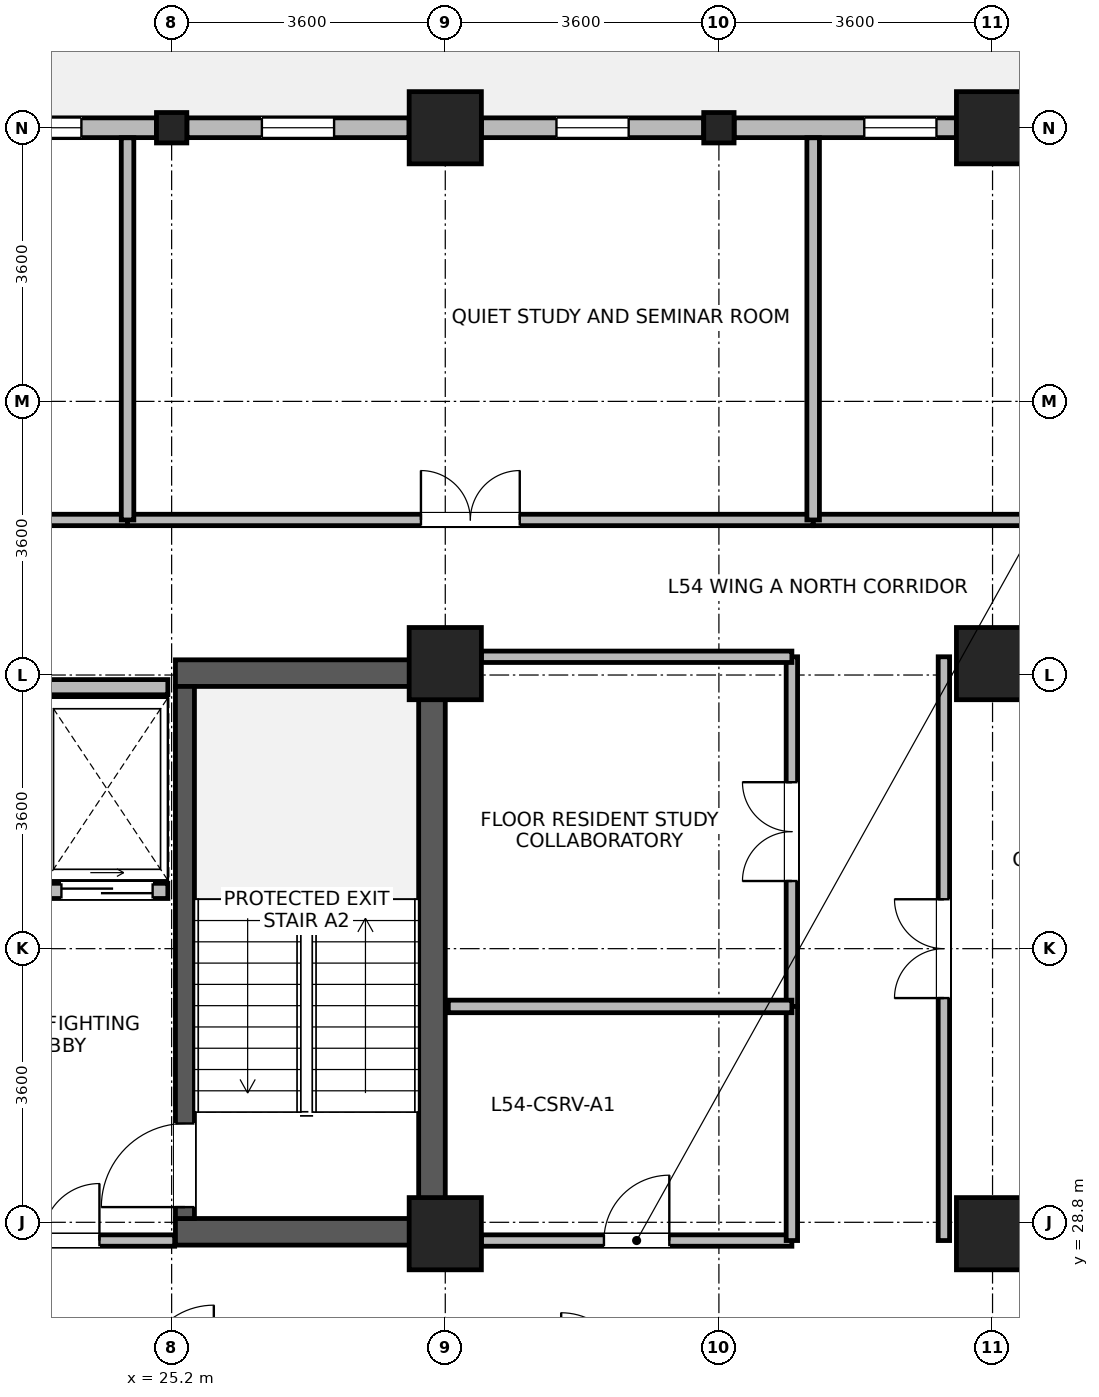
"""IFC4 building model, lengths in metres.
Left out: names, types, materials, properties, quantities, classifications, styles, units other than length and angle.
Written with IfcOpenShell. Run it as: python <this file> out.ifc"""

import sys

from ifc_helpers import new_model, si_unit, direction, frame, frame_2d, origin, origin_2d, place, context, subcontext, project, spatial, rectangle, i_section, extrude, source, transform, mapped, element, fill, save


model = new_model("IFC4")
c1 = context("Model", 3, precision=1e-05, world=origin(), true_north=direction((0.0, 1.0)))
c2 = subcontext(c1, "Body", "Model", "MODEL_VIEW")
j1 = project(units=[si_unit("LENGTHUNIT", "METRE"), si_unit("PLANEANGLEUNIT", "RADIAN")], contexts=[c1])
p1 = place(None, origin())
s1 = spatial("IfcSite", under=j1, at=p1, CompositionType="ELEMENT")
p2 = place(p1, origin())
s2 = spatial("IfcBuilding", under=s1, at=p2, CompositionType="ELEMENT")
p3 = place(p2, frame((0.0, 0.0, 212.9)))
s3 = spatial("IfcBuildingStorey", under=s2, at=p3, CompositionType="ELEMENT", Elevation=212.9)
p4 = place(p3, frame((28.625, 28.5, 0.0), z_axis=(0.0, 0.0, 1.0), x_axis=(0.0, 1.0, 0.0)))
e1 = element("IfcWall", 1, at=p4, inside=s3, PredefinedType="SHEAR", context=c2, shape_type="SweptSolid", body=[
    extrude(rectangle(XDim=7.7, YDim=0.35, at=frame_2d((3.85, 0.0))), origin(), (0.0, 0.0, 1.0), 3.47),
])
for number, where, z_axis, x_axis in (
    (2, (25.25, 28.675, 0.0), (0.0, 0.0, 1.0), (1.0, 0.0, 0.0)),
    (3, (25.25, 36.025, 0.0), (0.0, 0.0, 1.0), (1.0, 0.0, 0.0)),
):
    element("IfcWall", number, at=place(p3, frame(where, z_axis=z_axis, x_axis=x_axis)), inside=s3, PredefinedType="SHEAR", context=c2, shape_type="SweptSolid", body=[
        extrude(rectangle(XDim=3.2, YDim=0.35, at=frame_2d((1.6, 0.0))), origin(), (0.0, 0.0, 1.0), 3.47),
    ])
p5 = place(p3, frame((25.375, 28.85, 0.0), z_axis=(0.0, 0.0, 1.0), x_axis=(0.0, 1.0, 0.0)))
e4 = element("IfcWall", 4, at=p5, inside=s3, PredefinedType="SHEAR", context=c2, shape_type="SweptSolid", body=[
    extrude(rectangle(XDim=7.0, YDim=0.25, at=frame_2d((3.5, 0.0))), origin(), (0.0, 0.0, 1.0), 3.47),
])
p6 = place(p5, frame((0.15, 0.0, 0.0)))
e5 = element("IfcOpeningElement", 5, at=p6, cuts=e4, PredefinedType="OPENING", context=c2, shape_type="SweptSolid", body=[
    extrude(rectangle(XDim=1.1, YDim=2.08, at=frame_2d((0.55, 1.04))), frame((0.0, 0.135, 0.0), z_axis=(0.0, -1.0, 0.0), x_axis=(1.0, 0.0, 0.0)), (0.0, 0.0, 1.0), 0.27),
])
m1 = source(origin(), c2, "Body", "SweptSolid", [
    extrude(rectangle(XDim=0.95, YDim=0.95, at=origin_2d()), origin(), (0.0, 0.0, 1.0), 3.7),
])
for number, where, z_axis, x_axis in (
    (6, (28.8, 28.65, 0.0), (0.0, 0.0, 1.0), (1.0, 0.0, 0.0)),
    (7, (28.8, 36.15, 0.0), (0.0, 0.0, 1.0), (1.0, 0.0, 0.0)),
    (8, (28.8, 43.2, 0.0), (0.0, 0.0, 1.0), (1.0, 0.0, 0.0)),
    (9, (36.0, 43.2, 0.0), (0.0, 0.0, 1.0), (1.0, 0.0, 0.0)),
    (10, (36.0, 28.65, 0.0), (0.0, 0.0, 1.0), (1.0, 0.0, 0.0)),
    (11, (36.0, 36.15, 0.0), (0.0, 0.0, 1.0), (1.0, 0.0, 0.0)),
):
    element("IfcColumn", number, at=place(p3, frame(where, z_axis=z_axis, x_axis=x_axis)), inside=s3, PredefinedType="COLUMN", context=c2, shape_type="MappedRepresentation", body=[
        mapped(m1, transform((0.0, 0.0, 0.0), x_axis=(1.0, 0.0, 0.0), y_axis=(0.0, 1.0, 0.0), z_axis=(0.0, 0.0, 1.0), scale=1.0)),
    ])
m2 = source(origin(), c2, "Body", "SweptSolid", [
    extrude(i_section(OverallWidth=0.399, OverallDepth=0.4, WebThickness=0.017, FlangeThickness=0.023, FilletRadius=0.015, at=origin_2d()), origin(), (0.0, 0.0, 1.0), 3.7),
])
for number, where, z_axis, x_axis in (
    (12, (25.2, 43.2, 0.0), (0.0, 0.0, 1.0), (1.0, 0.0, 0.0)),
    (13, (32.4, 43.2, 0.0), (0.0, 0.0, 1.0), (1.0, 0.0, 0.0)),
):
    element("IfcColumn", number, at=place(p3, frame(where, z_axis=z_axis, x_axis=x_axis)), inside=s3, PredefinedType="COLUMN", context=c2, shape_type="MappedRepresentation", body=[
        mapped(m2, transform((0.0, 0.0, 0.0), x_axis=(1.0, 0.0, 0.0), y_axis=(0.0, 1.0, 0.0), z_axis=(0.0, 0.0, 1.0), scale=1.0)),
    ])
p7 = place(p3, frame((32.601, 43.2, 0.0), z_axis=(0.0, 0.0, 1.0), x_axis=(1.0, 0.0, 0.0)))
e14 = element("IfcWall", 14, at=p7, inside=s3, PredefinedType="STANDARD", context=c2, shape_type="SweptSolid", body=[
    extrude(rectangle(XDim=2.923, YDim=0.26, at=frame_2d((1.462, 0.0))), origin(), (0.0, 0.0, 1.0), 3.05),
])
p8 = place(p7, frame((1.712, 0.0, 0.85)))
e15 = element("IfcOpeningElement", 15, at=p8, cuts=e14, PredefinedType="OPENING", context=c2, shape_type="SweptSolid", body=[
    extrude(rectangle(XDim=0.95, YDim=1.75, at=frame_2d((0.475, 0.875))), frame((0.0, 0.14, 0.0), z_axis=(0.0, -1.0, 0.0), x_axis=(1.0, 0.0, 0.0)), (0.0, 0.0, 1.0), 0.28),
])
p9 = place(p3, frame((29.276, 43.2, 0.0), z_axis=(0.0, 0.0, 1.0), x_axis=(1.0, 0.0, 0.0)))
e16 = element("IfcWall", 16, at=p9, inside=s3, PredefinedType="STANDARD", context=c2, shape_type="SweptSolid", body=[
    extrude(rectangle(XDim=2.924, YDim=0.26, at=frame_2d((1.462, 0.0))), origin(), (0.0, 0.0, 1.0), 3.05),
])
p10 = place(p9, frame((0.987, 0.0, 0.85)))
e17 = element("IfcOpeningElement", 17, at=p10, cuts=e16, PredefinedType="OPENING", context=c2, shape_type="SweptSolid", body=[
    extrude(rectangle(XDim=0.95, YDim=1.75, at=frame_2d((0.475, 0.875))), frame((0.0, 0.14, 0.0), z_axis=(0.0, -1.0, 0.0), x_axis=(1.0, 0.0, 0.0)), (0.0, 0.0, 1.0), 0.28),
])
p11 = place(p3, frame((25.4, 43.2, 0.0), z_axis=(0.0, 0.0, 1.0), x_axis=(1.0, 0.0, 0.0)))
e18 = element("IfcWall", 18, at=p11, inside=s3, PredefinedType="STANDARD", context=c2, shape_type="SweptSolid", body=[
    extrude(rectangle(XDim=2.924, YDim=0.26, at=frame_2d((1.462, 0.0))), origin(), (0.0, 0.0, 1.0), 3.05),
])
p12 = place(p11, frame((0.987, 0.0, 0.85)))
e19 = element("IfcOpeningElement", 19, at=p12, cuts=e18, PredefinedType="OPENING", context=c2, shape_type="SweptSolid", body=[
    extrude(rectangle(XDim=0.95, YDim=1.75, at=frame_2d((0.475, 0.875))), frame((0.0, 0.14, 0.0), z_axis=(0.0, -1.0, 0.0), x_axis=(1.0, 0.0, 0.0)), (0.0, 0.0, 1.0), 0.28),
])
p13 = place(p3, frame((22.076, 43.2, 0.0), z_axis=(0.0, 0.0, 1.0), x_axis=(1.0, 0.0, 0.0)))
e20 = element("IfcWall", 20, at=p13, inside=s3, PredefinedType="STANDARD", context=c2, shape_type="SweptSolid", body=[
    extrude(rectangle(XDim=2.924, YDim=0.26, at=frame_2d((1.462, 0.0))), origin(), (0.0, 0.0, 1.0), 3.05),
])
p14 = place(p13, frame((0.987, 0.0, 0.85)))
e21 = element("IfcOpeningElement", 21, at=p14, cuts=e20, PredefinedType="OPENING", context=c2, shape_type="SweptSolid", body=[
    extrude(rectangle(XDim=0.95, YDim=1.75, at=frame_2d((0.475, 0.875))), frame((0.0, 0.14, 0.0), z_axis=(0.0, -1.0, 0.0), x_axis=(1.0, 0.0, 0.0)), (0.0, 0.0, 1.0), 0.28),
])
p15 = place(p3, frame((23.55, 33.16, 0.0), z_axis=(0.0, 0.0, 1.0), x_axis=(1.0, 0.0, 0.0)))
e22 = element("IfcWall", 22, at=p15, inside=s3, PredefinedType="PARTITIONING", context=c2, shape_type="SweptSolid", body=[
    extrude(rectangle(XDim=1.6, YDim=0.2, at=frame_2d((0.8, 0.0))), origin(), (0.0, 0.0, 1.0), 3.45),
])
p16 = place(p15, frame((0.2, 0.0, 0.0)))
e23 = element("IfcOpeningElement", 23, at=p16, cuts=e22, PredefinedType="OPENING", context=c2, shape_type="SweptSolid", body=[
    extrude(rectangle(XDim=1.2, YDim=2.12, at=frame_2d((0.6, 1.06))), frame((0.0, 0.11, 0.0), z_axis=(0.0, -1.0, 0.0), x_axis=(1.0, 0.0, 0.0)), (0.0, 0.0, 1.0), 0.22),
])
p17 = place(p3, frame((23.55, 35.84, 0.0), z_axis=(0.0, 0.0, 1.0), x_axis=(1.0, 0.0, 0.0)))
e24 = element("IfcWall", 24, at=p17, inside=s3, PredefinedType="PARTITIONING", context=c2, shape_type="SweptSolid", body=[
    extrude(rectangle(XDim=1.6, YDim=0.2, at=frame_2d((0.8, 0.0))), origin(), (0.0, 0.0, 1.0), 2.55),
])
p18 = place(p3, frame((33.64, 38.04, 0.0), z_axis=(0.0, 0.0, 1.0), x_axis=(1.0, 0.0, 0.0)))
e25 = element("IfcWall", 25, at=p18, inside=s3, PredefinedType="PARTITIONING", context=c2, shape_type="SweptSolid", body=[
    extrude(rectangle(XDim=11.68, YDim=0.15, at=frame_2d((5.84, 0.0))), origin(), (0.0, 0.0, 1.0), 3.45),
])
p19 = place(p18, frame((5.39, 0.0, 0.0)))
e26 = element("IfcOpeningElement", 26, at=p19, cuts=e25, PredefinedType="OPENING", context=c2, shape_type="SweptSolid", body=[
    extrude(rectangle(XDim=0.9, YDim=2.08, at=frame_2d((0.45, 1.04))), frame((0.0, 0.085, 0.0), z_axis=(0.0, -1.0, 0.0), x_axis=(1.0, 0.0, 0.0)), (0.0, 0.0, 1.0), 0.17),
])
p20 = place(p3, frame((14.92, 38.04, 0.0), z_axis=(0.0, 0.0, 1.0), x_axis=(1.0, 0.0, 0.0)))
e27 = element("IfcWall", 27, at=p20, inside=s3, PredefinedType="PARTITIONING", context=c2, shape_type="SweptSolid", body=[
    extrude(rectangle(XDim=9.7, YDim=0.15, at=frame_2d((4.85, 0.0))), origin(), (0.0, 0.0, 1.0), 3.45),
])
p21 = place(p20, frame((4.2, 0.0, 0.0)))
e28 = element("IfcOpeningElement", 28, at=p21, cuts=e27, PredefinedType="OPENING", context=c2, shape_type="SweptSolid", body=[
    extrude(rectangle(XDim=1.3, YDim=2.12, at=frame_2d((0.65, 1.06))), frame((0.0, 0.085, 0.0), z_axis=(0.0, -1.0, 0.0), x_axis=(1.0, 0.0, 0.0)), (0.0, 0.0, 1.0), 0.17),
])
p22 = place(p3, frame((24.62, 38.04, 0.0), z_axis=(0.0, 0.0, 1.0), x_axis=(1.0, 0.0, 0.0)))
e29 = element("IfcWall", 29, at=p22, inside=s3, PredefinedType="PARTITIONING", context=c2, shape_type="SweptSolid", body=[
    extrude(rectangle(XDim=9.02, YDim=0.15, at=frame_2d((4.51, 0.0))), origin(), (0.0, 0.0, 1.0), 3.45),
])
p23 = place(p22, frame((3.86, 0.0, 0.0)))
e30 = element("IfcOpeningElement", 30, at=p23, cuts=e29, PredefinedType="OPENING", context=c2, shape_type="SweptSolid", body=[
    extrude(rectangle(XDim=1.3, YDim=2.12, at=frame_2d((0.65, 1.06))), frame((0.0, 0.085, 0.0), z_axis=(0.0, -1.0, 0.0), x_axis=(1.0, 0.0, 0.0)), (0.0, 0.0, 1.0), 0.17),
])
p24 = place(p3, frame((35.36, 28.56, 0.0), z_axis=(0.0, 0.0, 1.0), x_axis=(0.0, 1.0, 0.0)))
e31 = element("IfcWall", 31, at=p24, inside=s3, PredefinedType="PARTITIONING", context=c2, shape_type="SweptSolid", body=[
    extrude(rectangle(XDim=7.68, YDim=0.15, at=frame_2d((3.84, 0.0))), origin(), (0.0, 0.0, 1.0), 3.45),
])
p25 = place(p24, frame((3.19, 0.0, 0.0)))
e32 = element("IfcOpeningElement", 32, at=p25, cuts=e31, PredefinedType="OPENING", context=c2, shape_type="SweptSolid", body=[
    extrude(rectangle(XDim=1.3, YDim=2.12, at=frame_2d((0.65, 1.06))), frame((0.0, 0.085, 0.0), z_axis=(0.0, -1.0, 0.0), x_axis=(1.0, 0.0, 0.0)), (0.0, 0.0, 1.0), 0.17),
])
p26 = place(p3, frame((33.36, 31.64, 0.0), z_axis=(0.0, 0.0, 1.0), x_axis=(0.0, 1.0, 0.0)))
e33 = element("IfcWall", 33, at=p26, inside=s3, PredefinedType="PARTITIONING", context=c2, shape_type="SweptSolid", body=[
    extrude(rectangle(XDim=4.6, YDim=0.15, at=frame_2d((2.3, 0.0))), origin(), (0.0, 0.0, 1.0), 3.45),
])
p27 = place(p26, frame((1.65, 0.0, 0.0)))
e34 = element("IfcOpeningElement", 34, at=p27, cuts=e33, PredefinedType="OPENING", context=c2, shape_type="SweptSolid", body=[
    extrude(rectangle(XDim=1.3, YDim=2.12, at=frame_2d((0.65, 1.06))), frame((0.0, 0.085, 0.0), z_axis=(0.0, -1.0, 0.0), x_axis=(1.0, 0.0, 0.0)), (0.0, 0.0, 1.0), 0.17),
])
p28 = place(p3, frame((29.275, 28.56, 0.0), z_axis=(0.0, 0.0, 1.0), x_axis=(1.0, 0.0, 0.0)))
e35 = element("IfcWall", 35, at=p28, inside=s3, PredefinedType="PARTITIONING", context=c2, shape_type="SweptSolid", body=[
    extrude(rectangle(XDim=4.085, YDim=0.15, at=frame_2d((2.042, 0.0))), origin(), (0.0, 0.0, 1.0), 2.9),
])
p29 = place(p28, frame((1.613, 0.0, 0.0)))
e36 = element("IfcOpeningElement", 36, at=p29, cuts=e35, PredefinedType="OPENING", context=c2, shape_type="SweptSolid", body=[
    extrude(rectangle(XDim=0.86, YDim=2.02, at=frame_2d((0.43, 1.01))), frame((0.0, 0.085, 0.0), z_axis=(0.0, -1.0, 0.0), x_axis=(1.0, 0.0, 0.0)), (0.0, 0.0, 1.0), 0.17),
])
p30 = place(p3, frame((29.275, 36.24, 0.0), z_axis=(0.0, 0.0, 1.0), x_axis=(1.0, 0.0, 0.0)))
e37 = element("IfcWall", 37, at=p30, inside=s3, PredefinedType="PARTITIONING", context=c2, shape_type="SweptSolid", body=[
    extrude(rectangle(XDim=4.085, YDim=0.15, at=frame_2d((2.042, 0.0))), origin(), (0.0, 0.0, 1.0), 2.9),
])
p31 = place(p3, frame((33.36, 28.56, 0.0), z_axis=(0.0, 0.0, 1.0), x_axis=(0.0, 1.0, 0.0)))
e38 = element("IfcWall", 38, at=p31, inside=s3, PredefinedType="PARTITIONING", context=c2, shape_type="SweptSolid", body=[
    extrude(rectangle(XDim=3.08, YDim=0.15, at=frame_2d((1.54, 0.0))), origin(), (0.0, 0.0, 1.0), 3.45),
])
for number, where, z_axis, x_axis in (
    (39, (24.62, 38.04, 0.0), (0.0, 0.0, 1.0), (0.0, 1.0, 0.0)),
    (40, (33.64, 38.04, 0.0), (0.0, 0.0, 1.0), (0.0, 1.0, 0.0)),
):
    element("IfcWall", number, at=place(p3, frame(where, z_axis=z_axis, x_axis=x_axis)), inside=s3, PredefinedType="PARTITIONING", context=c2, shape_type="SweptSolid", body=[
        extrude(rectangle(XDim=5.028, YDim=0.165, at=frame_2d((2.514, 0.0))), origin(), (0.0, 0.0, 1.0), 3.45),
    ])
p32 = place(p3, frame((28.84, 31.64, 0.0), z_axis=(0.0, 0.0, 1.0), x_axis=(1.0, 0.0, 0.0)))
e41 = element("IfcWall", 41, at=p32, inside=s3, PredefinedType="PARTITIONING", context=c2, shape_type="SweptSolid", body=[
    extrude(rectangle(XDim=4.52, YDim=0.165, at=frame_2d((2.26, 0.0))), origin(), (0.0, 0.0, 1.0), 3.45),
])
p33 = place(p3, frame((21.76, 28.56, 0.0), z_axis=(0.0, 0.0, 1.0), x_axis=(1.0, 0.0, 0.0)))
e42 = element("IfcWall", 42, at=p33, inside=s3, PredefinedType="PARTITIONING", context=c2, shape_type="SweptSolid", body=[
    extrude(rectangle(XDim=3.48, YDim=0.15, at=frame_2d((1.74, 0.0))), origin(), (0.0, 0.0, 1.0), 2.55),
])
p34 = place(p33, frame((0.99, 0.0, 0.0)))
e43 = element("IfcOpeningElement", 43, at=p34, cuts=e42, PredefinedType="OPENING", context=c2, shape_type="SweptSolid", body=[
    extrude(rectangle(XDim=1.5, YDim=2.1, at=frame_2d((0.75, 1.05))), frame((0.0, 0.085, 0.0), z_axis=(0.0, -1.0, 0.0), x_axis=(1.0, 0.0, 0.0)), (0.0, 0.0, 1.0), 0.17),
])
p35 = place(p8, origin())
e44 = element("IfcWindow", 44, at=p35, inside=s3, PartitioningType="SINGLE_PANEL", PredefinedType="WINDOW", context=c2, shape_type="SweptSolid", body=[
    extrude(rectangle(XDim=0.95, YDim=1.75, at=frame_2d((0.475, 0.875))), frame((0.0, 0.03, 0.0), z_axis=(0.0, -1.0, 0.0), x_axis=(1.0, 0.0, 0.0)), (0.0, 0.0, 1.0), 0.06),
])
fill(e15, e44)
p36 = place(p10, origin())
e45 = element("IfcWindow", 45, at=p36, inside=s3, PartitioningType="SINGLE_PANEL", PredefinedType="WINDOW", context=c2, shape_type="SweptSolid", body=[
    extrude(rectangle(XDim=0.95, YDim=1.75, at=frame_2d((0.475, 0.875))), frame((0.0, 0.03, 0.0), z_axis=(0.0, -1.0, 0.0), x_axis=(1.0, 0.0, 0.0)), (0.0, 0.0, 1.0), 0.06),
])
fill(e17, e45)
p37 = place(p12, origin())
e46 = element("IfcWindow", 46, at=p37, inside=s3, PartitioningType="SINGLE_PANEL", PredefinedType="WINDOW", context=c2, shape_type="SweptSolid", body=[
    extrude(rectangle(XDim=0.95, YDim=1.75, at=frame_2d((0.475, 0.875))), frame((0.0, 0.03, 0.0), z_axis=(0.0, -1.0, 0.0), x_axis=(1.0, 0.0, 0.0)), (0.0, 0.0, 1.0), 0.06),
])
fill(e19, e46)
p38 = place(p14, origin())
e47 = element("IfcWindow", 47, at=p38, inside=s3, PartitioningType="SINGLE_PANEL", PredefinedType="WINDOW", context=c2, shape_type="SweptSolid", body=[
    extrude(rectangle(XDim=0.95, YDim=1.75, at=frame_2d((0.475, 0.875))), frame((0.0, 0.03, 0.0), z_axis=(0.0, -1.0, 0.0), x_axis=(1.0, 0.0, 0.0)), (0.0, 0.0, 1.0), 0.06),
])
fill(e21, e47)
p39 = place(p6, origin())
e48 = element("IfcDoor", 48, at=p39, inside=s3, OperationType="SINGLE_SWING_LEFT", PredefinedType="DOOR", context=c2, shape_type="SweptSolid", body=[
    extrude(rectangle(XDim=1.1, YDim=2.08, at=frame_2d((0.55, 1.04))), frame((0.0, 0.025, 0.0), z_axis=(0.0, -1.0, 0.0), x_axis=(1.0, 0.0, 0.0)), (0.0, 0.0, 1.0), 0.05),
])
fill(e5, e48)
p40 = place(p16, origin())
e49 = element("IfcDoor", 49, at=p40, inside=s3, OperationType="SLIDING_TO_RIGHT", PredefinedType="DOOR", context=c2, shape_type="SweptSolid", body=[
    extrude(rectangle(XDim=1.2, YDim=2.12, at=frame_2d((0.6, 1.06))), frame((0.0, 0.025, 0.0), z_axis=(0.0, -1.0, 0.0), x_axis=(1.0, 0.0, 0.0)), (0.0, 0.0, 1.0), 0.05),
])
fill(e23, e49)
p41 = place(p23, origin())
e50 = element("IfcDoor", 50, at=p41, inside=s3, OperationType="DOUBLE_DOOR_SINGLE_SWING", PredefinedType="DOOR", context=c2, shape_type="SweptSolid", body=[
    extrude(rectangle(XDim=1.3, YDim=2.12, at=frame_2d((0.65, 1.06))), frame((0.0, 0.025, 0.0), z_axis=(0.0, -1.0, 0.0), x_axis=(1.0, 0.0, 0.0)), (0.0, 0.0, 1.0), 0.05),
])
fill(e30, e50)
p42 = place(p25, origin())
e51 = element("IfcDoor", 51, at=p42, inside=s3, OperationType="DOUBLE_DOOR_SINGLE_SWING", PredefinedType="DOOR", context=c2, shape_type="SweptSolid", body=[
    extrude(rectangle(XDim=1.3, YDim=2.12, at=frame_2d((0.65, 1.06))), frame((0.0, 0.025, 0.0), z_axis=(0.0, -1.0, 0.0), x_axis=(1.0, 0.0, 0.0)), (0.0, 0.0, 1.0), 0.05),
])
fill(e32, e51)
p43 = place(p27, origin())
e52 = element("IfcDoor", 52, at=p43, inside=s3, OperationType="DOUBLE_DOOR_SINGLE_SWING", PredefinedType="DOOR", context=c2, shape_type="SweptSolid", body=[
    extrude(rectangle(XDim=1.3, YDim=2.12, at=frame_2d((0.65, 1.06))), frame((0.0, 0.025, 0.0), z_axis=(0.0, -1.0, 0.0), x_axis=(1.0, 0.0, 0.0)), (0.0, 0.0, 1.0), 0.05),
])
fill(e34, e52)
p44 = place(p29, origin())
e53 = element("IfcDoor", 53, at=p44, inside=s3, OperationType="SINGLE_SWING_RIGHT", PredefinedType="DOOR", context=c2, shape_type="SweptSolid", body=[
    extrude(rectangle(XDim=0.86, YDim=2.02, at=frame_2d((0.43, 1.01))), frame((0.0, 0.025, 0.0), z_axis=(0.0, -1.0, 0.0), x_axis=(1.0, 0.0, 0.0)), (0.0, 0.0, 1.0), 0.05),
])
fill(e36, e53)
p45 = place(p34, origin())
e54 = element("IfcDoor", 54, at=p45, inside=s3, OperationType="DOUBLE_DOOR_SINGLE_SWING", PredefinedType="DOOR", context=c2, shape_type="SweptSolid", body=[
    extrude(rectangle(XDim=1.5, YDim=2.1, at=frame_2d((0.75, 1.05))), frame((0.0, 0.025, 0.0), z_axis=(0.0, -1.0, 0.0), x_axis=(1.0, 0.0, 0.0)), (0.0, 0.0, 1.0), 0.05),
])
fill(e43, e54)
save(model, sys.argv[1])
